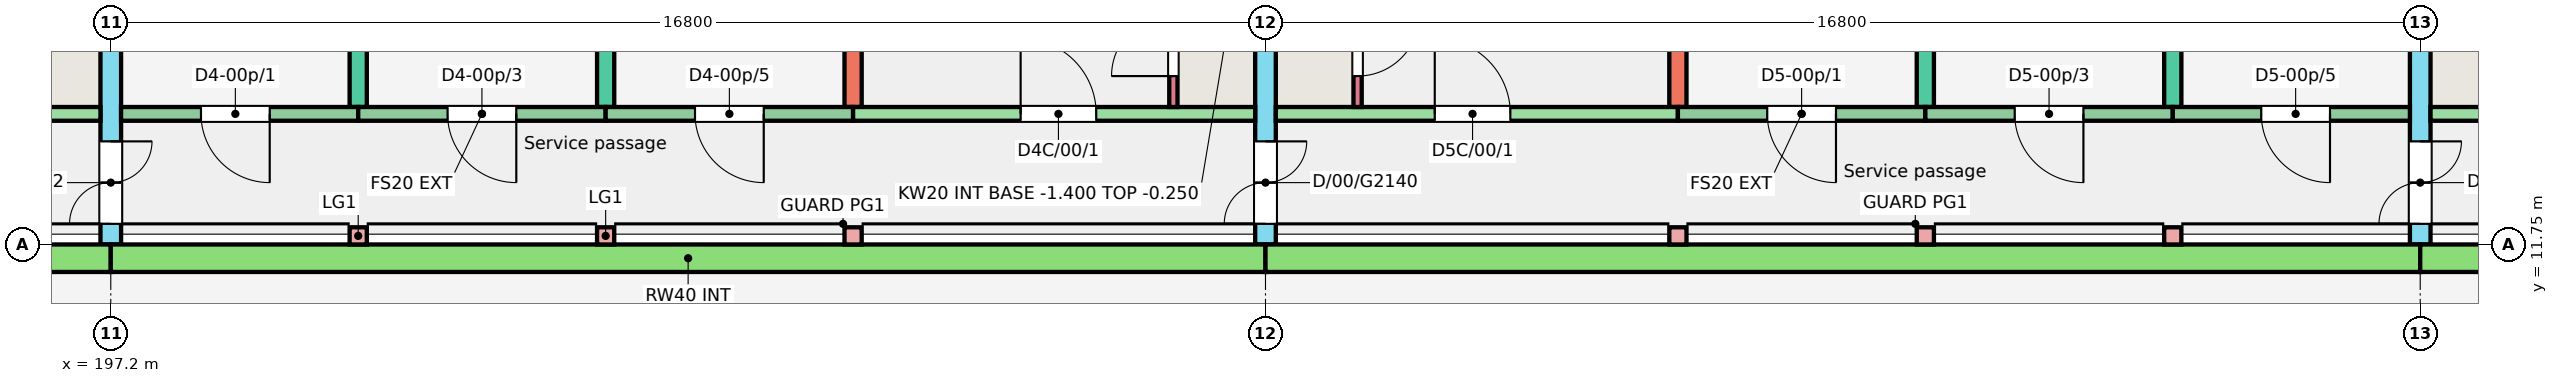
"""IFC4 building model, lengths in metres.
Left out: names, types, materials, properties, quantities, classifications, styles, units other than length and angle.
Written with IfcOpenShell. Run it as: python <this file> out.ifc"""

import sys

from ifc_helpers import new_model, si_unit, direction, frame, frame_2d, origin, origin_2d, place, context, subcontext, project, spatial, rectangle, extrude, element, fill, save


model = new_model("IFC4")
c1 = context("Model", 3, precision=1e-05, world=origin(), true_north=direction((0.0, 1.0)))
c2 = subcontext(c1, "Body", "Model", "MODEL_VIEW")
j1 = project(units=[si_unit("LENGTHUNIT", "METRE"), si_unit("PLANEANGLEUNIT", "RADIAN")], contexts=[c1])
p1 = place(None, origin())
s1 = spatial("IfcSite", under=j1, at=p1, CompositionType="ELEMENT")
p2 = place(p1, origin())
s2 = spatial("IfcBuilding", under=s1, at=p2, CompositionType="ELEMENT")
p3 = place(p2, origin())
s3 = spatial("IfcBuildingStorey", under=s2, at=p3, CompositionType="ELEMENT", Elevation=0.0)
p4 = place(p3, frame((197.2, 11.75, -0.25), z_axis=(0.0, 0.0, 1.0), x_axis=(0.0, 1.0, 0.0)))
e1 = element("IfcWall", 1, at=p4, inside=s3, PredefinedType="SHEAR", context=c2, shape_type="SweptSolid", body=[
    extrude(rectangle(XDim=11.0, YDim=0.3, at=frame_2d((5.5, 0.0))), origin(), (0.0, 0.0, 1.0), 3.25),
])
p5 = place(p4, frame((0.3, 0.0, 0.25)))
e2 = element("IfcOpeningElement", 2, at=p5, cuts=e1, PredefinedType="OPENING", context=c2, shape_type="SweptSolid", body=[
    extrude(rectangle(XDim=1.2, YDim=2.1, at=frame_2d((0.6, 1.05))), frame((0.0, 0.16, 0.0), z_axis=(0.0, -1.0, 0.0), x_axis=(1.0, 0.0, 0.0)), (0.0, 0.0, 1.0), 0.32),
])
for number, where, z_axis, x_axis in (
    (3, (200.8, 13.75, -0.25), (0.0, 0.0, 1.0), (0.0, 1.0, 0.0)),
    (4, (204.4, 13.75, -0.25), (0.0, 0.0, 1.0), (0.0, 1.0, 0.0)),
    (5, (208.0, 13.75, -0.25), (0.0, 0.0, 1.0), (0.0, 1.0, 0.0)),
):
    element("IfcWall", number, at=place(p3, frame(where, z_axis=z_axis, x_axis=x_axis)), inside=s3, PredefinedType="SHEAR", context=c2, shape_type="SweptSolid", body=[
        extrude(rectangle(XDim=9.0, YDim=0.25, at=frame_2d((4.5, 0.0))), origin(), (0.0, 0.0, 1.0), 3.25),
    ])
p6 = place(p3, frame((214.0, 11.75, -0.25), z_axis=(0.0, 0.0, 1.0), x_axis=(0.0, 1.0, 0.0)))
e6 = element("IfcWall", 6, at=p6, inside=s3, PredefinedType="SHEAR", context=c2, shape_type="SweptSolid", body=[
    extrude(rectangle(XDim=11.0, YDim=0.3, at=frame_2d((5.5, 0.0))), origin(), (0.0, 0.0, 1.0), 3.25),
])
p7 = place(p6, frame((0.3, 0.0, 0.25)))
e7 = element("IfcOpeningElement", 7, at=p7, cuts=e6, PredefinedType="OPENING", context=c2, shape_type="SweptSolid", body=[
    extrude(rectangle(XDim=1.2, YDim=2.1, at=frame_2d((0.6, 1.05))), frame((0.0, 0.16, 0.0), z_axis=(0.0, -1.0, 0.0), x_axis=(1.0, 0.0, 0.0)), (0.0, 0.0, 1.0), 0.32),
])
for number, where, z_axis, x_axis in (
    (8, (220.0, 13.75, -0.25), (0.0, 0.0, 1.0), (0.0, 1.0, 0.0)),
    (9, (223.6, 13.75, -0.25), (0.0, 0.0, 1.0), (0.0, 1.0, 0.0)),
    (10, (227.2, 13.75, -0.25), (0.0, 0.0, 1.0), (0.0, 1.0, 0.0)),
):
    element("IfcWall", number, at=place(p3, frame(where, z_axis=z_axis, x_axis=x_axis)), inside=s3, PredefinedType="SHEAR", context=c2, shape_type="SweptSolid", body=[
        extrude(rectangle(XDim=9.0, YDim=0.25, at=frame_2d((4.5, 0.0))), origin(), (0.0, 0.0, 1.0), 3.25),
    ])
p8 = place(p3, frame((230.8, 11.75, -0.25), z_axis=(0.0, 0.0, 1.0), x_axis=(0.0, 1.0, 0.0)))
e11 = element("IfcWall", 11, at=p8, inside=s3, PredefinedType="SHEAR", context=c2, shape_type="SweptSolid", body=[
    extrude(rectangle(XDim=11.0, YDim=0.3, at=frame_2d((5.5, 0.0))), origin(), (0.0, 0.0, 1.0), 3.25),
])
p9 = place(p8, frame((0.3, 0.0, 0.25)))
e12 = element("IfcOpeningElement", 12, at=p9, cuts=e11, PredefinedType="OPENING", context=c2, shape_type="SweptSolid", body=[
    extrude(rectangle(XDim=1.2, YDim=2.1, at=frame_2d((0.6, 1.05))), frame((0.0, 0.16, 0.0), z_axis=(0.0, -1.0, 0.0), x_axis=(1.0, 0.0, 0.0)), (0.0, 0.0, 1.0), 0.32),
])
p10 = place(p3, frame((191.2, 13.65, -0.25), z_axis=(0.0, 0.0, 1.0), x_axis=(1.0, 0.0, 0.0)))
e13 = element("IfcWall", 13, at=p10, inside=s3, PredefinedType="SHEAR", context=c2, shape_type="SweptSolid", body=[
    extrude(rectangle(XDim=5.85, YDim=0.2, at=frame_2d((2.925, 0.0))), origin(), (0.0, 0.0, 1.0), 3.25),
])
p11 = place(p10, frame((2.438, 0.0, 0.25)))
e14 = element("IfcOpeningElement", 14, at=p11, cuts=e13, PredefinedType="OPENING", context=c2, shape_type="SweptSolid", body=[
    extrude(rectangle(XDim=1.1, YDim=2.1, at=frame_2d((0.55, 1.05))), frame((0.0, 0.11, 0.0), z_axis=(0.0, -1.0, 0.0), x_axis=(1.0, 0.0, 0.0)), (0.0, 0.0, 1.0), 0.22),
])
p12 = place(p3, frame((197.35, 13.65, -0.25), z_axis=(0.0, 0.0, 1.0), x_axis=(1.0, 0.0, 0.0)))
e15 = element("IfcWall", 15, at=p12, inside=s3, PredefinedType="SOLIDWALL", context=c2, shape_type="SweptSolid", body=[
    extrude(rectangle(XDim=3.45, YDim=0.2, at=frame_2d((1.725, 0.0))), origin(), (0.0, 0.0, 1.0), 3.25),
])
p13 = place(p12, frame((1.163, 0.0, 0.25)))
e16 = element("IfcOpeningElement", 16, at=p13, cuts=e15, PredefinedType="OPENING", context=c2, shape_type="SweptSolid", body=[
    extrude(rectangle(XDim=1.0, YDim=2.1, at=frame_2d((0.5, 1.05))), frame((0.0, 0.11, 0.0), z_axis=(0.0, -1.0, 0.0), x_axis=(1.0, 0.0, 0.0)), (0.0, 0.0, 1.0), 0.22),
])
p14 = place(p3, frame((200.8, 13.65, -0.25), z_axis=(0.0, 0.0, 1.0), x_axis=(1.0, 0.0, 0.0)))
e17 = element("IfcWall", 17, at=p14, inside=s3, PredefinedType="SOLIDWALL", context=c2, shape_type="SweptSolid", body=[
    extrude(rectangle(XDim=3.6, YDim=0.2, at=frame_2d((1.8, 0.0))), origin(), (0.0, 0.0, 1.0), 3.25),
])
p15 = place(p14, frame((1.3, 0.0, 0.25)))
e18 = element("IfcOpeningElement", 18, at=p15, cuts=e17, PredefinedType="OPENING", context=c2, shape_type="SweptSolid", body=[
    extrude(rectangle(XDim=1.0, YDim=2.1, at=frame_2d((0.5, 1.05))), frame((0.0, 0.11, 0.0), z_axis=(0.0, -1.0, 0.0), x_axis=(1.0, 0.0, 0.0)), (0.0, 0.0, 1.0), 0.22),
])
p16 = place(p3, frame((204.4, 13.65, -0.25), z_axis=(0.0, 0.0, 1.0), x_axis=(1.0, 0.0, 0.0)))
e19 = element("IfcWall", 19, at=p16, inside=s3, PredefinedType="SOLIDWALL", context=c2, shape_type="SweptSolid", body=[
    extrude(rectangle(XDim=3.6, YDim=0.2, at=frame_2d((1.8, 0.0))), origin(), (0.0, 0.0, 1.0), 3.25),
])
p17 = place(p16, frame((1.3, 0.0, 0.25)))
e20 = element("IfcOpeningElement", 20, at=p17, cuts=e19, PredefinedType="OPENING", context=c2, shape_type="SweptSolid", body=[
    extrude(rectangle(XDim=1.0, YDim=2.1, at=frame_2d((0.5, 1.05))), frame((0.0, 0.11, 0.0), z_axis=(0.0, -1.0, 0.0), x_axis=(1.0, 0.0, 0.0)), (0.0, 0.0, 1.0), 0.22),
])
p18 = place(p3, frame((208.0, 13.65, -0.25), z_axis=(0.0, 0.0, 1.0), x_axis=(1.0, 0.0, 0.0)))
e21 = element("IfcWall", 21, at=p18, inside=s3, PredefinedType="SHEAR", context=c2, shape_type="SweptSolid", body=[
    extrude(rectangle(XDim=5.85, YDim=0.2, at=frame_2d((2.925, 0.0))), origin(), (0.0, 0.0, 1.0), 3.25),
])
p19 = place(p18, frame((2.438, 0.0, 0.25)))
e22 = element("IfcOpeningElement", 22, at=p19, cuts=e21, PredefinedType="OPENING", context=c2, shape_type="SweptSolid", body=[
    extrude(rectangle(XDim=1.1, YDim=2.1, at=frame_2d((0.55, 1.05))), frame((0.0, 0.11, 0.0), z_axis=(0.0, -1.0, 0.0), x_axis=(1.0, 0.0, 0.0)), (0.0, 0.0, 1.0), 0.22),
])
p20 = place(p3, frame((212.66, 13.75, -0.25), z_axis=(0.0, 0.0, 1.0), x_axis=(0.0, 1.0, 0.0)))
e23 = element("IfcWall", 23, at=p20, inside=s3, PredefinedType="SHEAR", context=c2, shape_type="SweptSolid", body=[
    extrude(rectangle(XDim=1.72, YDim=0.12, at=frame_2d((0.86, 0.0))), origin(), (0.0, 0.0, 1.0), 3.25),
])
p21 = place(p20, frame((0.45, 0.0, 0.25)))
e24 = element("IfcOpeningElement", 24, at=p21, cuts=e23, PredefinedType="OPENING", context=c2, shape_type="SweptSolid", body=[
    extrude(rectangle(XDim=0.9, YDim=2.1, at=frame_2d((0.45, 1.05))), frame((0.0, 0.07, 0.0), z_axis=(0.0, -1.0, 0.0), x_axis=(1.0, 0.0, 0.0)), (0.0, 0.0, 1.0), 0.14),
])
p22 = place(p3, frame((214.15, 13.65, -0.25), z_axis=(0.0, 0.0, 1.0), x_axis=(1.0, 0.0, 0.0)))
e25 = element("IfcWall", 25, at=p22, inside=s3, PredefinedType="SHEAR", context=c2, shape_type="SweptSolid", body=[
    extrude(rectangle(XDim=5.85, YDim=0.2, at=frame_2d((2.925, 0.0))), origin(), (0.0, 0.0, 1.0), 3.25),
])
p23 = place(p22, frame((2.312, 0.0, 0.25)))
e26 = element("IfcOpeningElement", 26, at=p23, cuts=e25, PredefinedType="OPENING", context=c2, shape_type="SweptSolid", body=[
    extrude(rectangle(XDim=1.1, YDim=2.1, at=frame_2d((0.55, 1.05))), frame((0.0, 0.11, 0.0), z_axis=(0.0, -1.0, 0.0), x_axis=(1.0, 0.0, 0.0)), (0.0, 0.0, 1.0), 0.22),
])
p24 = place(p3, frame((215.34, 13.75, -0.25), z_axis=(0.0, 0.0, 1.0), x_axis=(0.0, 1.0, 0.0)))
e27 = element("IfcWall", 27, at=p24, inside=s3, PredefinedType="SHEAR", context=c2, shape_type="SweptSolid", body=[
    extrude(rectangle(XDim=1.72, YDim=0.12, at=frame_2d((0.86, 0.0))), origin(), (0.0, 0.0, 1.0), 3.25),
])
p25 = place(p24, frame((0.45, 0.0, 0.25)))
e28 = element("IfcOpeningElement", 28, at=p25, cuts=e27, PredefinedType="OPENING", context=c2, shape_type="SweptSolid", body=[
    extrude(rectangle(XDim=0.9, YDim=2.1, at=frame_2d((0.45, 1.05))), frame((0.0, 0.07, 0.0), z_axis=(0.0, -1.0, 0.0), x_axis=(1.0, 0.0, 0.0)), (0.0, 0.0, 1.0), 0.14),
])
p26 = place(p3, frame((220.0, 13.65, -0.25), z_axis=(0.0, 0.0, 1.0), x_axis=(1.0, 0.0, 0.0)))
e29 = element("IfcWall", 29, at=p26, inside=s3, PredefinedType="SOLIDWALL", context=c2, shape_type="SweptSolid", body=[
    extrude(rectangle(XDim=3.6, YDim=0.2, at=frame_2d((1.8, 0.0))), origin(), (0.0, 0.0, 1.0), 3.25),
])
p27 = place(p26, frame((1.3, 0.0, 0.25)))
e30 = element("IfcOpeningElement", 30, at=p27, cuts=e29, PredefinedType="OPENING", context=c2, shape_type="SweptSolid", body=[
    extrude(rectangle(XDim=1.0, YDim=2.1, at=frame_2d((0.5, 1.05))), frame((0.0, 0.11, 0.0), z_axis=(0.0, -1.0, 0.0), x_axis=(1.0, 0.0, 0.0)), (0.0, 0.0, 1.0), 0.22),
])
p28 = place(p3, frame((223.6, 13.65, -0.25), z_axis=(0.0, 0.0, 1.0), x_axis=(1.0, 0.0, 0.0)))
e31 = element("IfcWall", 31, at=p28, inside=s3, PredefinedType="SOLIDWALL", context=c2, shape_type="SweptSolid", body=[
    extrude(rectangle(XDim=3.6, YDim=0.2, at=frame_2d((1.8, 0.0))), origin(), (0.0, 0.0, 1.0), 3.25),
])
p29 = place(p28, frame((1.3, 0.0, 0.25)))
e32 = element("IfcOpeningElement", 32, at=p29, cuts=e31, PredefinedType="OPENING", context=c2, shape_type="SweptSolid", body=[
    extrude(rectangle(XDim=1.0, YDim=2.1, at=frame_2d((0.5, 1.05))), frame((0.0, 0.11, 0.0), z_axis=(0.0, -1.0, 0.0), x_axis=(1.0, 0.0, 0.0)), (0.0, 0.0, 1.0), 0.22),
])
p30 = place(p3, frame((227.2, 13.65, -0.25), z_axis=(0.0, 0.0, 1.0), x_axis=(1.0, 0.0, 0.0)))
e33 = element("IfcWall", 33, at=p30, inside=s3, PredefinedType="SOLIDWALL", context=c2, shape_type="SweptSolid", body=[
    extrude(rectangle(XDim=3.45, YDim=0.2, at=frame_2d((1.725, 0.0))), origin(), (0.0, 0.0, 1.0), 3.25),
])
p31 = place(p30, frame((1.288, 0.0, 0.25)))
e34 = element("IfcOpeningElement", 34, at=p31, cuts=e33, PredefinedType="OPENING", context=c2, shape_type="SweptSolid", body=[
    extrude(rectangle(XDim=1.0, YDim=2.1, at=frame_2d((0.5, 1.05))), frame((0.0, 0.11, 0.0), z_axis=(0.0, -1.0, 0.0), x_axis=(1.0, 0.0, 0.0)), (0.0, 0.0, 1.0), 0.22),
])
p32 = place(p3, frame((230.95, 13.65, -0.25), z_axis=(0.0, 0.0, 1.0), x_axis=(1.0, 0.0, 0.0)))
e35 = element("IfcWall", 35, at=p32, inside=s3, PredefinedType="SHEAR", context=c2, shape_type="SweptSolid", body=[
    extrude(rectangle(XDim=5.85, YDim=0.2, at=frame_2d((2.925, 0.0))), origin(), (0.0, 0.0, 1.0), 3.25),
])
p33 = place(p32, frame((2.312, 0.0, 0.25)))
e36 = element("IfcOpeningElement", 36, at=p33, cuts=e35, PredefinedType="OPENING", context=c2, shape_type="SweptSolid", body=[
    extrude(rectangle(XDim=1.1, YDim=2.1, at=frame_2d((0.55, 1.05))), frame((0.0, 0.11, 0.0), z_axis=(0.0, -1.0, 0.0), x_axis=(1.0, 0.0, 0.0)), (0.0, 0.0, 1.0), 0.22),
])
for number, where, z_axis, x_axis in (
    (37, (200.8, 11.875, -0.25), (0.0, 0.0, 1.0), (1.0, 0.0, 0.0)),
    (38, (204.4, 11.875, -0.25), (0.0, 0.0, 1.0), (1.0, 0.0, 0.0)),
    (39, (208.0, 11.875, -0.25), (0.0, 0.0, 1.0), (1.0, 0.0, 0.0)),
    (40, (220.0, 11.875, -0.25), (0.0, 0.0, 1.0), (1.0, 0.0, 0.0)),
    (41, (223.6, 11.875, -0.25), (0.0, 0.0, 1.0), (1.0, 0.0, 0.0)),
    (42, (227.2, 11.875, -0.25), (0.0, 0.0, 1.0), (1.0, 0.0, 0.0)),
):
    element("IfcColumn", number, at=place(p3, frame(where, z_axis=z_axis, x_axis=x_axis)), inside=s3, PredefinedType="COLUMN", context=c2, shape_type="SweptSolid", body=[
        extrude(rectangle(XDim=0.25, YDim=0.25, at=origin_2d()), origin(), (0.0, 0.0, 1.0), 3.25),
    ])
for number, where, z_axis, x_axis in (
    (43, (180.4, 11.55, -0.25), (0.0, 0.0, 1.0), (1.0, 0.0, 0.0)),
    (44, (197.2, 11.55, -0.25), (0.0, 0.0, 1.0), (1.0, 0.0, 0.0)),
    (45, (214.0, 11.55, -0.25), (0.0, 0.0, 1.0), (1.0, 0.0, 0.0)),
    (46, (230.8, 11.55, -0.25), (0.0, 0.0, 1.0), (1.0, 0.0, 0.0)),
):
    element("IfcWall", number, at=place(p3, frame(where, z_axis=z_axis, x_axis=x_axis)), inside=s3, PredefinedType="SOLIDWALL", context=c2, shape_type="SweptSolid", body=[
        extrude(rectangle(XDim=16.8, YDim=0.4, at=frame_2d((8.4, 0.0))), origin(), (0.0, 0.0, 1.0), 3.25),
    ])
p34 = place(p13, origin())
e47 = element("IfcDoor", 47, at=p34, inside=s3, OperationType="SINGLE_SWING_RIGHT", PredefinedType="DOOR", context=c2, shape_type="SweptSolid", body=[
    extrude(rectangle(XDim=1.0, YDim=2.1, at=frame_2d((0.5, 1.05))), frame((0.0, 0.025, 0.0), z_axis=(0.0, -1.0, 0.0), x_axis=(1.0, 0.0, 0.0)), (0.0, 0.0, 1.0), 0.05),
])
fill(e16, e47)
p35 = place(p15, origin())
e48 = element("IfcDoor", 48, at=p35, inside=s3, OperationType="SINGLE_SWING_RIGHT", PredefinedType="DOOR", context=c2, shape_type="SweptSolid", body=[
    extrude(rectangle(XDim=1.0, YDim=2.1, at=frame_2d((0.5, 1.05))), frame((0.0, 0.025, 0.0), z_axis=(0.0, -1.0, 0.0), x_axis=(1.0, 0.0, 0.0)), (0.0, 0.0, 1.0), 0.05),
])
fill(e18, e48)
p36 = place(p17, origin())
e49 = element("IfcDoor", 49, at=p36, inside=s3, OperationType="SINGLE_SWING_RIGHT", PredefinedType="DOOR", context=c2, shape_type="SweptSolid", body=[
    extrude(rectangle(XDim=1.0, YDim=2.1, at=frame_2d((0.5, 1.05))), frame((0.0, 0.025, 0.0), z_axis=(0.0, -1.0, 0.0), x_axis=(1.0, 0.0, 0.0)), (0.0, 0.0, 1.0), 0.05),
])
fill(e20, e49)
p37 = place(p27, origin())
e50 = element("IfcDoor", 50, at=p37, inside=s3, OperationType="SINGLE_SWING_RIGHT", PredefinedType="DOOR", context=c2, shape_type="SweptSolid", body=[
    extrude(rectangle(XDim=1.0, YDim=2.1, at=frame_2d((0.5, 1.05))), frame((0.0, 0.025, 0.0), z_axis=(0.0, -1.0, 0.0), x_axis=(1.0, 0.0, 0.0)), (0.0, 0.0, 1.0), 0.05),
])
fill(e30, e50)
p38 = place(p29, origin())
e51 = element("IfcDoor", 51, at=p38, inside=s3, OperationType="SINGLE_SWING_RIGHT", PredefinedType="DOOR", context=c2, shape_type="SweptSolid", body=[
    extrude(rectangle(XDim=1.0, YDim=2.1, at=frame_2d((0.5, 1.05))), frame((0.0, 0.025, 0.0), z_axis=(0.0, -1.0, 0.0), x_axis=(1.0, 0.0, 0.0)), (0.0, 0.0, 1.0), 0.05),
])
fill(e32, e51)
p39 = place(p31, origin())
e52 = element("IfcDoor", 52, at=p39, inside=s3, OperationType="SINGLE_SWING_RIGHT", PredefinedType="DOOR", context=c2, shape_type="SweptSolid", body=[
    extrude(rectangle(XDim=1.0, YDim=2.1, at=frame_2d((0.5, 1.05))), frame((0.0, 0.025, 0.0), z_axis=(0.0, -1.0, 0.0), x_axis=(1.0, 0.0, 0.0)), (0.0, 0.0, 1.0), 0.05),
])
fill(e34, e52)
p40 = place(p19, origin())
e53 = element("IfcDoor", 53, at=p40, inside=s3, OperationType="SINGLE_SWING_LEFT", PredefinedType="DOOR", context=c2, shape_type="SweptSolid", body=[
    extrude(rectangle(XDim=1.1, YDim=2.1, at=frame_2d((0.55, 1.05))), frame((0.0, 0.025, 0.0), z_axis=(0.0, -1.0, 0.0), x_axis=(1.0, 0.0, 0.0)), (0.0, 0.0, 1.0), 0.05),
])
fill(e22, e53)
p41 = place(p21, origin())
e54 = element("IfcDoor", 54, at=p41, inside=s3, OperationType="SINGLE_SWING_LEFT", PredefinedType="DOOR", context=c2, shape_type="SweptSolid", body=[
    extrude(rectangle(XDim=0.9, YDim=2.1, at=frame_2d((0.45, 1.05))), frame((0.0, 0.025, 0.0), z_axis=(0.0, -1.0, 0.0), x_axis=(1.0, 0.0, 0.0)), (0.0, 0.0, 1.0), 0.05),
])
fill(e24, e54)
p42 = place(p23, origin())
e55 = element("IfcDoor", 55, at=p42, inside=s3, OperationType="SINGLE_SWING_LEFT", PredefinedType="DOOR", context=c2, shape_type="SweptSolid", body=[
    extrude(rectangle(XDim=1.1, YDim=2.1, at=frame_2d((0.55, 1.05))), frame((0.0, 0.025, 0.0), z_axis=(0.0, -1.0, 0.0), x_axis=(1.0, 0.0, 0.0)), (0.0, 0.0, 1.0), 0.05),
])
fill(e26, e55)
p43 = place(p25, origin())
e56 = element("IfcDoor", 56, at=p43, inside=s3, OperationType="SINGLE_SWING_RIGHT", PredefinedType="DOOR", context=c2, shape_type="SweptSolid", body=[
    extrude(rectangle(XDim=0.9, YDim=2.1, at=frame_2d((0.45, 1.05))), frame((0.0, 0.025, 0.0), z_axis=(0.0, -1.0, 0.0), x_axis=(1.0, 0.0, 0.0)), (0.0, 0.0, 1.0), 0.05),
])
fill(e28, e56)
p44 = place(p5, origin())
e57 = element("IfcDoor", 57, at=p44, inside=s3, OperationType="DOUBLE_DOOR_SINGLE_SWING", PredefinedType="DOOR", context=c2, shape_type="SweptSolid", body=[
    extrude(rectangle(XDim=1.2, YDim=2.1, at=frame_2d((0.6, 1.05))), frame((0.0, 0.025, 0.0), z_axis=(0.0, -1.0, 0.0), x_axis=(1.0, 0.0, 0.0)), (0.0, 0.0, 1.0), 0.05),
])
fill(e2, e57)
p45 = place(p7, origin())
e58 = element("IfcDoor", 58, at=p45, inside=s3, OperationType="DOUBLE_DOOR_SINGLE_SWING", PredefinedType="DOOR", context=c2, shape_type="SweptSolid", body=[
    extrude(rectangle(XDim=1.2, YDim=2.1, at=frame_2d((0.6, 1.05))), frame((0.0, 0.025, 0.0), z_axis=(0.0, -1.0, 0.0), x_axis=(1.0, 0.0, 0.0)), (0.0, 0.0, 1.0), 0.05),
])
fill(e7, e58)
p46 = place(p9, origin())
e59 = element("IfcDoor", 59, at=p46, inside=s3, OperationType="DOUBLE_DOOR_SINGLE_SWING", PredefinedType="DOOR", context=c2, shape_type="SweptSolid", body=[
    extrude(rectangle(XDim=1.2, YDim=2.1, at=frame_2d((0.6, 1.05))), frame((0.0, 0.025, 0.0), z_axis=(0.0, -1.0, 0.0), x_axis=(1.0, 0.0, 0.0)), (0.0, 0.0, 1.0), 0.05),
])
fill(e12, e59)
save(model, sys.argv[1])
